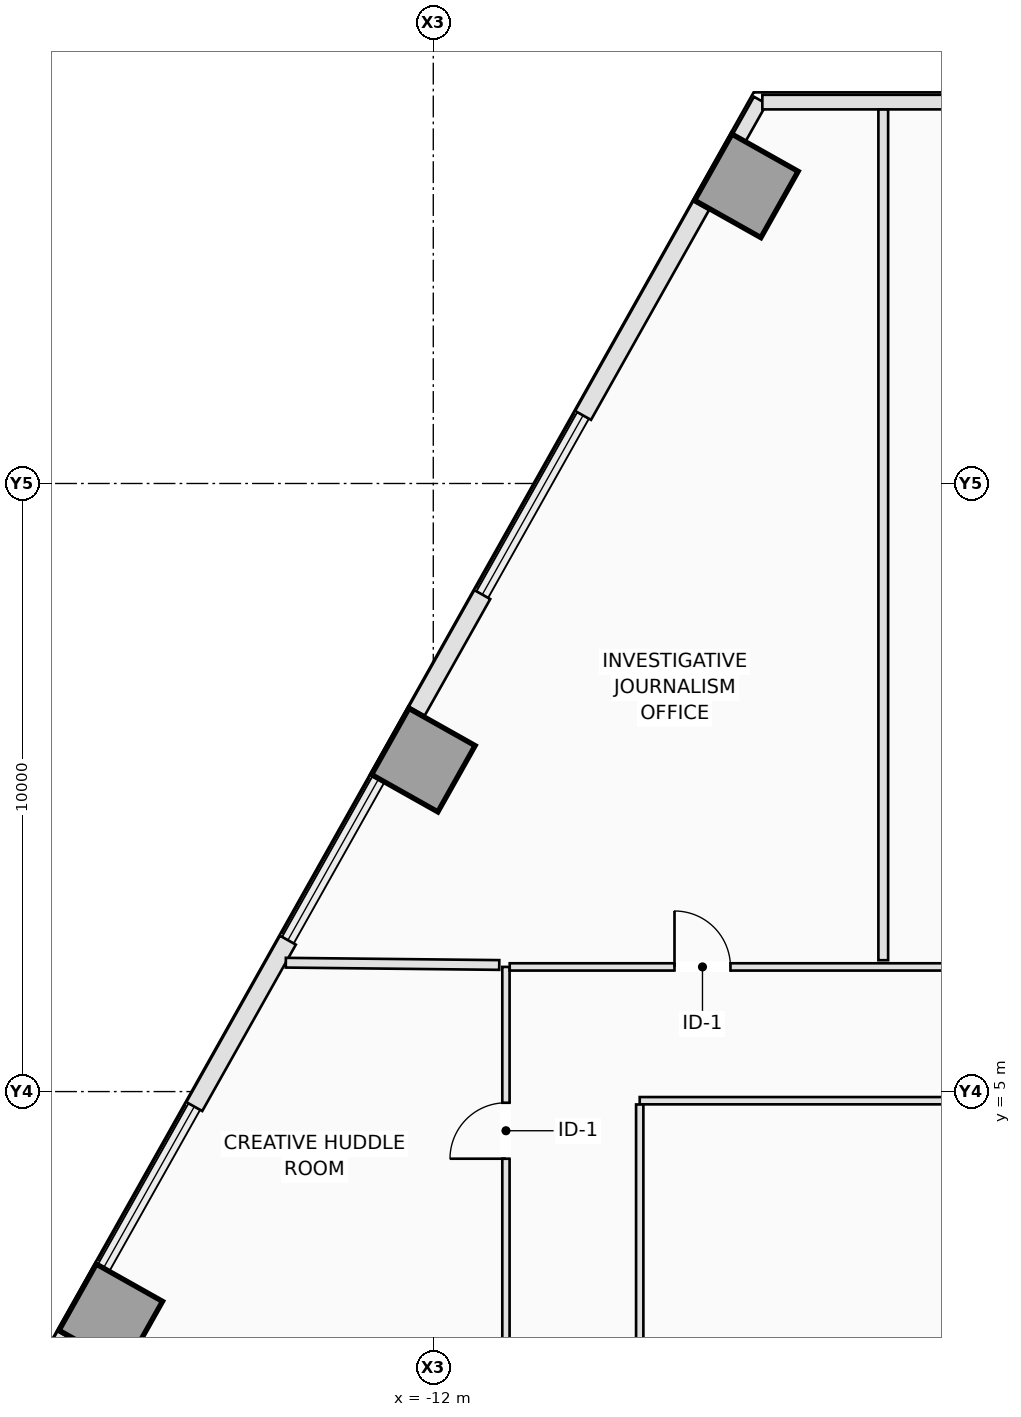
"""IFC4 building model, lengths in metres.
Left out: names, types, materials, properties, quantities, classifications, styles, units other than length and angle.
Written with IfcOpenShell. Run it as: python <this file> out.ifc"""

import sys

from ifc_helpers import new_model, si_unit, direction, frame, frame_2d, origin, origin_2d, place, context, subcontext, project, spatial, rectangle, extrude, element, fill, save


model = new_model("IFC4")
c1 = context("Model", 3, precision=1e-05, world=origin(), true_north=direction((0.0, 1.0)))
c2 = subcontext(c1, "Body", "Model", "MODEL_VIEW")
j1 = project(units=[si_unit("LENGTHUNIT", "METRE"), si_unit("PLANEANGLEUNIT", "RADIAN")], contexts=[c1])
p1 = place(None, origin())
s1 = spatial("IfcSite", under=j1, at=p1, CompositionType="ELEMENT")
p2 = place(p1, origin())
s2 = spatial("IfcBuilding", under=s1, at=p2, CompositionType="ELEMENT")
p3 = place(p2, frame((0.0, 0.0, 73.1)))
s3 = spatial("IfcBuildingStorey", under=s2, at=p3, CompositionType="ELEMENT", Elevation=73.1)
for number, where, z_axis, x_axis in (
    (1, (-6.851, 19.895, 0.0), (0.0, 0.0, 1.0), (-0.872, 0.49, 0.0)),
    (2, (-12.163, 10.451, 0.0), (0.0, 0.0, 1.0), (-0.872, 0.49, 0.0)),
    (3, (-17.304, 1.312, 0.0), (0.0, 0.0, 1.0), (-0.872, 0.49, 0.0)),
):
    element("IfcColumn", number, at=place(p3, frame(where, z_axis=z_axis, x_axis=x_axis)), inside=s3, PredefinedType="COLUMN", context=c2, shape_type="SweptSolid", body=[
        extrude(rectangle(XDim=1.25, YDim=1.25, at=origin_2d()), origin(), (0.0, 0.0, 1.0), 3.5),
    ])
p4 = place(p3, frame((-6.969, 20.684, 0.0), z_axis=(0.0, 0.0, 1.0), x_axis=(0.490261239633, 0.871575537125, 0.0)))
e4 = element("IfcWall", 4, at=p4, inside=s3, PredefinedType="STANDARD", context=c2, shape_type="SweptSolid", body=[
    extrude(rectangle(XDim=0.708, YDim=0.24, at=frame_2d((0.354, 0.0))), origin(), (0.0, 0.0, 1.0), 3.25),
])
p5 = place(p3, frame((-19.127, -0.93, 0.0), z_axis=(0.0, 0.0, 1.0), x_axis=(0.490277063651, 0.871566635925, 0.0)))
e5 = element("IfcWall", 5, at=p5, inside=s3, PredefinedType="STANDARD", context=c2, shape_type="SweptSolid", body=[
    extrude(rectangle(XDim=2.198, YDim=0.3, at=frame_2d((1.099, 0.0))), origin(), (0.0, 0.0, 1.0), 3.25),
])
p6 = place(p3, frame((-12.271, 11.258, 0.0), z_axis=(0.0, 0.0, 1.0), x_axis=(0.490324540864, 0.871539927156, 0.0)))
e6 = element("IfcWall", 6, at=p6, inside=s3, PredefinedType="STANDARD", context=c2, shape_type="SweptSolid", body=[
    extrude(rectangle(XDim=2.197, YDim=0.3, at=frame_2d((1.099, 0.0))), origin(), (0.0, 0.0, 1.0), 3.25),
])
p7 = place(p3, frame((-9.537, 16.12, 0.0), z_axis=(0.0, 0.0, 1.0), x_axis=(0.490240735008, 0.871587070659, 0.0)))
e7 = element("IfcWall", 7, at=p7, inside=s3, PredefinedType="STANDARD", context=c2, shape_type="SweptSolid", body=[
    extrude(rectangle(XDim=3.957, YDim=0.3, at=frame_2d((1.979, 0.0))), origin(), (0.0, 0.0, 1.0), 3.25),
])
p8 = place(p3, frame((-15.93, 4.753, 0.0), z_axis=(0.0, 0.0, 1.0), x_axis=(0.490290775148, 0.871558922738, 0.0)))
e8 = element("IfcWall", 8, at=p8, inside=s3, PredefinedType="STANDARD", context=c2, shape_type="SweptSolid", body=[
    extrude(rectangle(XDim=3.14, YDim=0.3, at=frame_2d((1.57, 0.0))), origin(), (0.0, 0.0, 1.0), 3.25),
])
p9 = place(p3, frame((6.598, 21.272, 0.0), z_axis=(0.0, 0.0, 1.0), x_axis=(-1.0, 0.0, 0.0)))
e9 = element("IfcWall", 9, at=p9, inside=s3, PredefinedType="STANDARD", context=c2, shape_type="SweptSolid", body=[
    extrude(rectangle(XDim=13.187, YDim=0.24, at=frame_2d((6.593, 0.0))), origin(), (0.0, 0.0, 1.0), 3.25),
])
p10 = place(p9, frame((5.693, 0.0, 0.9)))
e10 = element("IfcOpeningElement", 10, at=p10, cuts=e9, PredefinedType="OPENING", context=c2, shape_type="SweptSolid", body=[
    extrude(rectangle(XDim=1.8, YDim=2.1, at=frame_2d((0.9, 1.05))), frame((0.0, 0.13, 0.0), z_axis=(0.0, -1.0, 0.0), x_axis=(1.0, 0.0, 0.0)), (0.0, 0.0, 1.0), 0.26),
])
p11 = place(p3, frame((-10.805, -2.338, 0.0), z_axis=(0.0, 0.0, 1.0), x_axis=(0.0, 1.0, 0.0)))
e11 = element("IfcWall", 11, at=p11, inside=s3, PredefinedType="PARTITIONING", context=c2, shape_type="SweptSolid", body=[
    extrude(rectangle(XDim=9.388, YDim=0.12, at=frame_2d((4.694, 0.0))), origin(), (0.0, 0.0, 1.0), 3.25),
])
p12 = place(p11, frame((6.234, 0.0, 0.0)))
e12 = element("IfcOpeningElement", 12, at=p12, cuts=e11, PredefinedType="OPENING", context=c2, shape_type="SweptSolid", body=[
    extrude(rectangle(XDim=0.92, YDim=2.12, at=frame_2d((0.46, 1.06))), frame((0.0, 0.07, 0.0), z_axis=(0.0, -1.0, 0.0), x_axis=(1.0, 0.0, 0.0)), (0.0, 0.0, 1.0), 0.14),
])
p13 = place(p11, frame((1.089, 0.0, 0.0)))
e13 = element("IfcOpeningElement", 13, at=p13, cuts=e11, PredefinedType="OPENING", context=c2, shape_type="SweptSolid", body=[
    extrude(rectangle(XDim=0.92, YDim=2.12, at=frame_2d((0.46, 1.06))), frame((0.0, 0.07, 0.0), z_axis=(0.0, -1.0, 0.0), x_axis=(1.0, 0.0, 0.0)), (0.0, 0.0, 1.0), 0.14),
])
p14 = place(p3, frame((-10.743, 7.05, 0.0), z_axis=(0.0, 0.0, 1.0), x_axis=(1.0, 0.0, 0.0)))
e14 = element("IfcWall", 14, at=p14, inside=s3, PredefinedType="PARTITIONING", context=c2, shape_type="SweptSolid", body=[
    extrude(rectangle(XDim=21.638, YDim=0.12, at=frame_2d((10.819, 0.0))), origin(), (0.0, 0.0, 1.0), 3.25),
])
p15 = place(p14, frame((9.903, 0.0, 0.0)))
e15 = element("IfcOpeningElement", 15, at=p15, cuts=e14, PredefinedType="OPENING", context=c2, shape_type="SweptSolid", body=[
    extrude(rectangle(XDim=0.92, YDim=2.12, at=frame_2d((0.46, 1.06))), frame((0.0, 0.07, 0.0), z_axis=(0.0, -1.0, 0.0), x_axis=(1.0, 0.0, 0.0)), (0.0, 0.0, 1.0), 0.14),
])
p16 = place(p14, frame((16.503, 0.0, 0.0)))
e16 = element("IfcOpeningElement", 16, at=p16, cuts=e14, PredefinedType="OPENING", context=c2, shape_type="SweptSolid", body=[
    extrude(rectangle(XDim=0.92, YDim=2.12, at=frame_2d((0.46, 1.06))), frame((0.0, 0.07, 0.0), z_axis=(0.0, -1.0, 0.0), x_axis=(1.0, 0.0, 0.0)), (0.0, 0.0, 1.0), 0.14),
])
p17 = place(p14, frame((2.71, 0.0, 0.0)))
e17 = element("IfcOpeningElement", 17, at=p17, cuts=e14, PredefinedType="OPENING", context=c2, shape_type="SweptSolid", body=[
    extrude(rectangle(XDim=0.92, YDim=2.12, at=frame_2d((0.46, 1.06))), frame((0.0, 0.07, 0.0), z_axis=(0.0, -1.0, 0.0), x_axis=(1.0, 0.0, 0.0)), (0.0, 0.0, 1.0), 0.14),
])
p18 = place(p14, frame((18.361, 0.0, 0.0)))
e18 = element("IfcOpeningElement", 18, at=p18, cuts=e14, PredefinedType="OPENING", context=c2, shape_type="SweptSolid", body=[
    extrude(rectangle(XDim=0.92, YDim=2.12, at=frame_2d((0.46, 1.06))), frame((0.0, 0.07, 0.0), z_axis=(0.0, -1.0, 0.0), x_axis=(1.0, 0.0, 0.0)), (0.0, 0.0, 1.0), 0.14),
])
p19 = place(p3, frame((8.633, 4.85, 0.0), z_axis=(0.0, 0.0, 1.0), x_axis=(-1.0, 0.0, 0.0)))
e19 = element("IfcWall", 19, at=p19, inside=s3, PredefinedType="PARTITIONING", context=c2, shape_type="SweptSolid", body=[
    extrude(rectangle(XDim=17.238, YDim=0.12, at=frame_2d((8.619, 0.0))), origin(), (0.0, 0.0, 1.0), 2.844),
])
p20 = place(p3, frame((-8.605, 4.788, 0.0), z_axis=(0.0, 0.0, 1.0), x_axis=(0.0, -1.0, 0.0)))
e20 = element("IfcWall", 20, at=p20, inside=s3, PredefinedType="PARTITIONING", context=c2, shape_type="SweptSolid", body=[
    extrude(rectangle(XDim=7.126, YDim=0.12, at=frame_2d((3.563, 0.0))), origin(), (0.0, 0.0, 1.0), 3.25),
])
p21 = place(p3, frame((-4.6, 7.16, 0.0), z_axis=(0.0, 0.0, 1.0), x_axis=(0.0, 1.0, 0.0)))
e21 = element("IfcWall", 21, at=p21, inside=s3, PredefinedType="PARTITIONING", context=c2, shape_type="SweptSolid", body=[
    extrude(rectangle(XDim=13.99, YDim=0.16, at=frame_2d((6.995, 0.0))), origin(), (0.0, 0.0, 1.0), 3.25),
])
p22 = place(p3, frame((-10.915, 7.082, 0.0), z_axis=(0.0, 0.0, 1.0), x_axis=(-0.99994262827, 0.010711683692, 0.0)))
e22 = element("IfcWall", 22, at=p22, inside=s3, PredefinedType="PARTITIONING", context=c2, shape_type="SweptSolid", body=[
    extrude(rectangle(XDim=3.51, YDim=0.16, at=frame_2d((1.755, 0.0))), origin(), (0.0, 0.0, 1.0), 3.25),
])
p23 = place(p17, origin())
e23 = element("IfcDoor", 23, at=p23, inside=s3, OperationType="SINGLE_SWING_LEFT", PredefinedType="DOOR", context=c2, shape_type="SweptSolid", body=[
    extrude(rectangle(XDim=0.92, YDim=2.12, at=frame_2d((0.46, 1.06))), frame((0.0, 0.025, 0.0), z_axis=(0.0, -1.0, 0.0), x_axis=(1.0, 0.0, 0.0)), (0.0, 0.0, 1.0), 0.05),
])
fill(e17, e23)
p24 = place(p12, origin())
e24 = element("IfcDoor", 24, at=p24, inside=s3, OperationType="SINGLE_SWING_LEFT", PredefinedType="DOOR", context=c2, shape_type="SweptSolid", body=[
    extrude(rectangle(XDim=0.92, YDim=2.12, at=frame_2d((0.46, 1.06))), frame((0.0, 0.025, 0.0), z_axis=(0.0, -1.0, 0.0), x_axis=(1.0, 0.0, 0.0)), (0.0, 0.0, 1.0), 0.05),
])
fill(e12, e24)
save(model, sys.argv[1])
